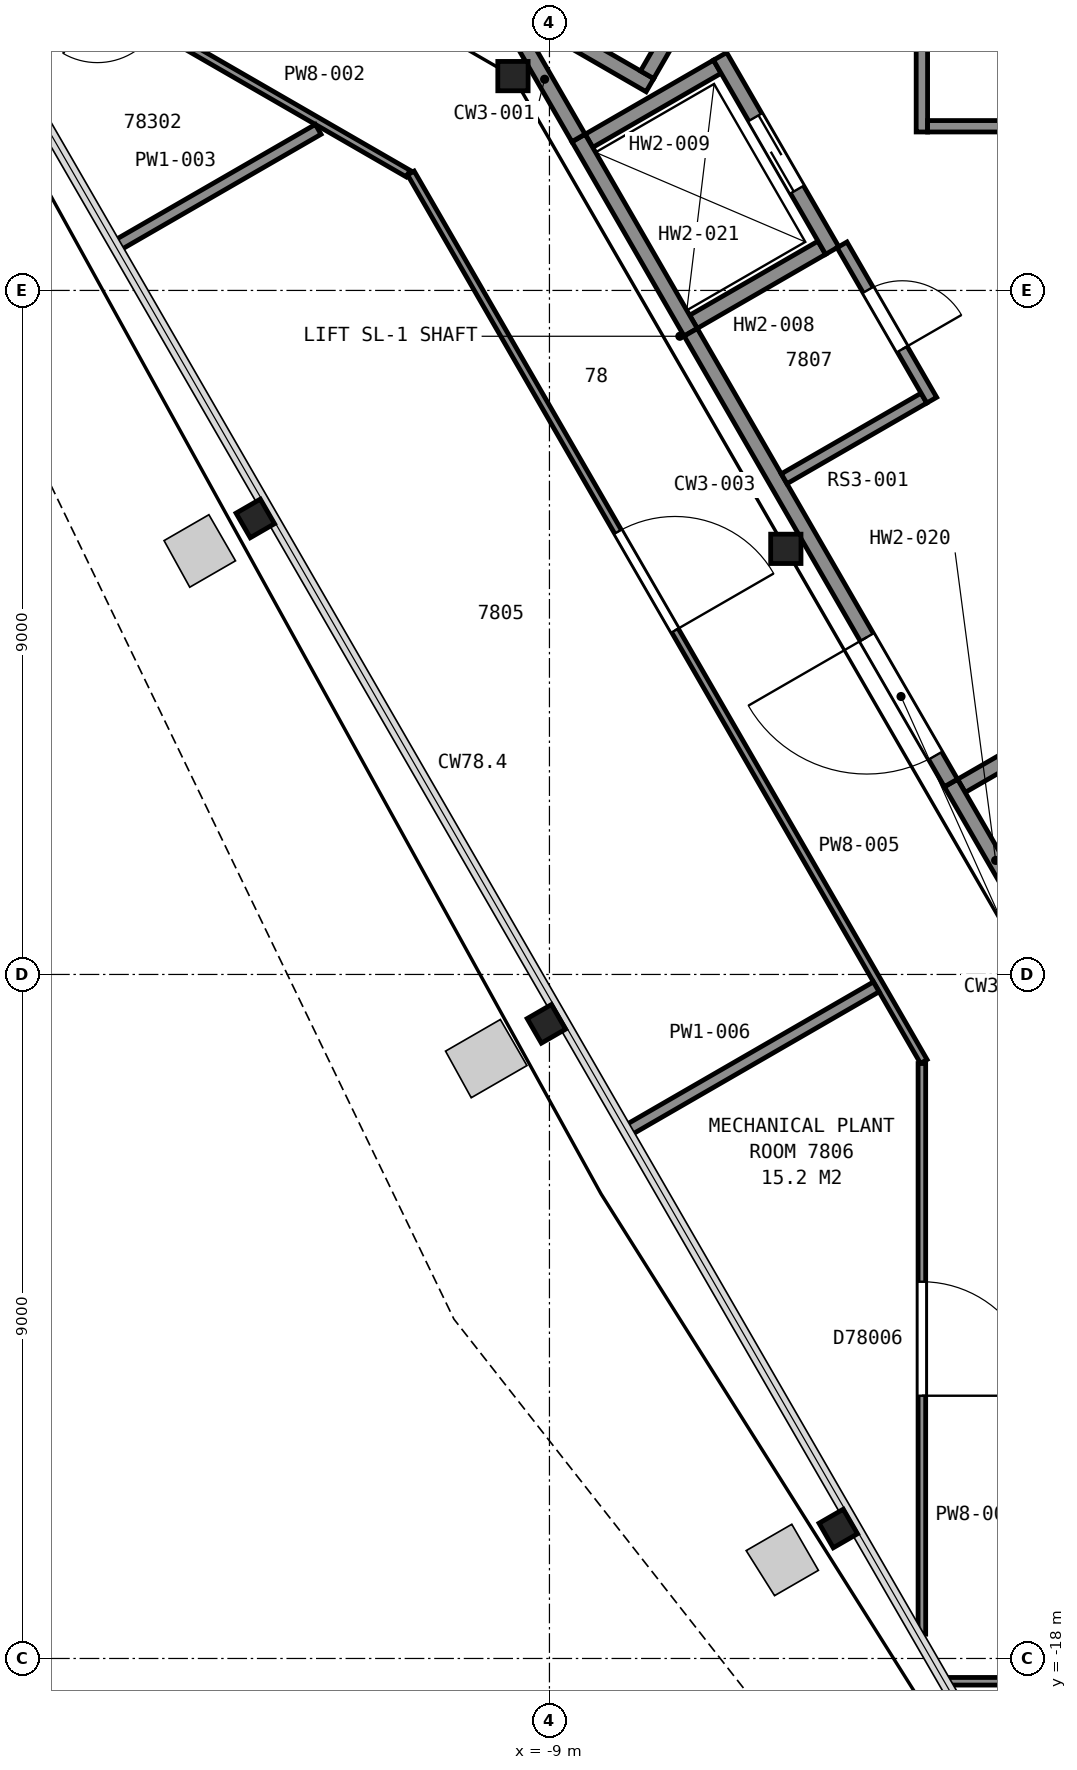
"""IFC4 building model, lengths in metres.
Left out: names, types, materials, properties, quantities, classifications, styles, units other than length and angle.
Written with IfcOpenShell. Run it as: python <this file> out.ifc"""

import sys

from ifc_helpers import new_model, si_unit, direction, frame, frame_2d, origin, origin_2d, place, context, subcontext, project, spatial, rectangle, i_section, extrude, element, fill, save


model = new_model("IFC4")
c1 = context("Model", 3, precision=1e-05, world=origin(), true_north=direction((0.0, 1.0)))
c2 = subcontext(c1, "Body", "Model", "MODEL_VIEW")
j1 = project(units=[si_unit("LENGTHUNIT", "METRE"), si_unit("PLANEANGLEUNIT", "RADIAN")], contexts=[c1])
p1 = place(None, origin())
s1 = spatial("IfcSite", under=j1, at=p1, CompositionType="ELEMENT")
p2 = place(p1, origin())
s2 = spatial("IfcBuilding", under=s1, at=p2, CompositionType="ELEMENT")
p3 = place(p2, frame((0.0, 0.0, 308.4)))
s3 = spatial("IfcBuildingStorey", under=s2, at=p3, CompositionType="ELEMENT", Elevation=308.4)
for number, where, z_axis, x_axis in (
    (1, (-12.87, -3.0, 0.045), (0.0, 0.0, 1.0), (-0.5, 0.866, 0.0)),
    (2, (-9.04, -9.65, 0.045), (0.0, 0.0, 1.0), (-0.5, 0.866, 0.0)),
):
    element("IfcColumn", number, at=place(p3, frame(where, z_axis=z_axis, x_axis=x_axis)), inside=s3, PredefinedType="COLUMN", context=c2, shape_type="SweptSolid", body=[
        extrude(i_section(OverallWidth=0.373, OverallDepth=0.368, WebThickness=0.015, FlangeThickness=0.024, FilletRadius=0.015, at=origin_2d()), origin(), (0.0, 0.0, 1.0), 4.155),
    ])
p4 = place(p3, frame((-5.2, -16.29, 0.055), z_axis=(0.0, 0.0, 1.0), x_axis=(-0.5, 0.866025403784, 0.0)))
e3 = element("IfcColumn", 3, at=p4, inside=s3, PredefinedType="COLUMN", context=c2, shape_type="SweptSolid", body=[
    extrude(i_section(OverallWidth=0.373, OverallDepth=0.368, WebThickness=0.015, FlangeThickness=0.024, FilletRadius=0.015, at=origin_2d()), origin(), (0.0, 0.0, 1.0), 4.145),
])
for number, where, z_axis, x_axis in (
    (4, (-9.48, 2.82, 0.0), (0.0, 0.0, 1.0), (1.0, 0.0, 0.0)),
    (5, (-5.89, -3.4, 0.0), (0.0, 0.0, 1.0), (1.0, 0.0, 0.0)),
):
    element("IfcColumn", number, at=place(p3, frame(where, z_axis=z_axis, x_axis=x_axis)), inside=s3, PredefinedType="COLUMN", context=c2, shape_type="SweptSolid", body=[
        extrude(i_section(OverallWidth=0.399, OverallDepth=0.386, WebThickness=0.021, FlangeThickness=0.033, FilletRadius=0.015, at=origin_2d()), origin(), (0.0, 0.0, 1.0), 4.2),
    ])
p5 = place(p3, frame((-7.678, 2.701, 0.0), z_axis=(0.0, 0.0, 1.0), x_axis=(-0.866018442252, 0.500012057535, 0.0)))
e6 = element("IfcWall", 6, at=p5, inside=s3, PredefinedType="PARTITIONING", context=c2, shape_type="SweptSolid", body=[
    extrude(rectangle(XDim=7.2, YDim=0.2, at=frame_2d((3.6, 0.0))), origin(), (0.0, 0.0, 1.0), 3.95),
])
p6 = place(p3, frame((-6.315, 5.262, 0.0), z_axis=(0.0, 0.0, 1.0), x_axis=(-0.500049511043, -0.865996816683, 0.0)))
e7 = element("IfcWall", 7, at=p6, inside=s3, PredefinedType="PARTITIONING", context=c2, shape_type="SweptSolid", body=[
    extrude(rectangle(XDim=2.8, YDim=0.2, at=frame_2d((1.4, 0.0))), origin(), (0.0, 0.0, 1.0), 3.95),
])
p7 = place(p3, frame((-3.58, -6.519, 0.0), z_axis=(0.0, 0.0, 1.0), x_axis=(0.866002029911, 0.500040482552, 0.0)))
e8 = element("IfcWall", 8, at=p7, inside=s3, PredefinedType="PARTITIONING", context=c2, shape_type="SweptSolid", body=[
    extrude(rectangle(XDim=1.75, YDim=0.2, at=frame_2d((0.875, 0.0))), origin(), (0.0, 0.0, 1.0), 3.95),
])
for number, where, z_axis, x_axis in (
    (9, (-7.105, -0.413, 0.0), (0.0, 0.0, 1.0), (0.866, 0.5, 0.0)),
    (10, (-8.48, 1.969, 0.0), (0.0, 0.0, 1.0), (0.866, 0.5, 0.0)),
):
    element("IfcWall", number, at=place(p3, frame(where, z_axis=z_axis, x_axis=x_axis)), inside=s3, PredefinedType="PARTITIONING", context=c2, shape_type="SweptSolid", body=[
        extrude(rectangle(XDim=1.95, YDim=0.2, at=frame_2d((0.975, 0.0))), origin(), (0.0, 0.0, 1.0), 4.2),
    ])
p8 = place(p3, frame((-5.28, 0.525, 0.0), z_axis=(0.0, 0.0, 1.0), x_axis=(-0.500037662692, 0.866003658127, 0.0)))
e11 = element("IfcWall", 11, at=p8, inside=s3, PredefinedType="PARTITIONING", context=c2, shape_type="SweptSolid", body=[
    extrude(rectangle(XDim=2.95, YDim=0.2, at=frame_2d((1.475, 0.0))), origin(), (0.0, 0.0, 1.0), 4.2),
])
p9 = place(p8, frame((0.925, 0.0, 0.0)))
e12 = element("IfcOpeningElement", 12, at=p9, cuts=e11, PredefinedType="OPENING", context=c2, shape_type="SweptSolid", body=[
    extrude(rectangle(XDim=1.1, YDim=2.1, at=frame_2d((0.55, 1.05))), frame((0.0, 0.11, 0.0), z_axis=(0.0, -1.0, 0.0), x_axis=(1.0, 0.0, 0.0)), (0.0, 0.0, 1.0), 0.22),
])
p10 = place(p3, frame((-2.542, -8.517, 0.0), z_axis=(0.0, 0.0, 1.0), x_axis=(-0.500016218704, 0.866016039709, 0.0)))
e13 = element("IfcWall", 13, at=p10, inside=s3, PredefinedType="PARTITIONING", context=c2, shape_type="SweptSolid", body=[
    extrude(rectangle(XDim=2.35, YDim=0.2, at=frame_2d((1.175, 0.0))), origin(), (0.0, 0.0, 1.0), 3.95),
])
p11 = place(p3, frame((-7.142, -0.55, 0.0), z_axis=(0.0, 0.0, 1.0), x_axis=(-0.49997559174, 0.866039495442, 0.0)))
e14 = element("IfcWall", 14, at=p11, inside=s3, PredefinedType="PARTITIONING", context=c2, shape_type="SweptSolid", body=[
    extrude(rectangle(XDim=2.95, YDim=0.2, at=frame_2d((1.475, 0.0))), origin(), (0.0, 0.0, 1.0), 4.2),
])
p12 = place(p3, frame((-9.509, 3.551, 0.0), z_axis=(0.0, 0.0, 1.0), x_axis=(0.499999136801, -0.866025902152, 0.0)))
e15 = element("IfcWall", 15, at=p12, inside=s3, PredefinedType="PARTITIONING", context=c2, shape_type="SweptSolid", body=[
    extrude(rectangle(XDim=1.782, YDim=0.2, at=frame_2d((0.891, 0.0))), origin(), (0.0, 0.0, 1.0), 3.95),
])
p13 = place(p3, frame((-7.141, -0.551, 0.0), z_axis=(0.0, 0.0, 1.0), x_axis=(0.500001302854, -0.86602465158, 0.0)))
e16 = element("IfcWall", 16, at=p13, inside=s3, PredefinedType="PARTITIONING", context=c2, shape_type="SweptSolid", body=[
    extrude(rectangle(XDim=6.846, YDim=0.2, at=frame_2d((3.423, 0.0))), origin(), (0.0, 0.0, 1.0), 3.95),
])
p14 = place(p13, frame((4.633, 0.0, 0.0)))
e17 = element("IfcOpeningElement", 17, at=p14, cuts=e16, PredefinedType="OPENING", context=c2, shape_type="SweptSolid", body=[
    extrude(rectangle(XDim=1.8, YDim=2.1, at=frame_2d((0.9, 1.05))), frame((0.0, 0.11, 0.0), z_axis=(0.0, -1.0, 0.0), x_axis=(1.0, 0.0, 0.0)), (0.0, 0.0, 1.0), 0.22),
])
p15 = place(p3, frame((-5.912, -2.478, 0.0), z_axis=(0.0, 0.0, 1.0), x_axis=(0.86611284933, 0.499848509276, 0.0)))
e18 = element("IfcWall", 18, at=p15, inside=s3, PredefinedType="PARTITIONING", context=c2, shape_type="SweptSolid", body=[
    extrude(rectangle(XDim=2.124, YDim=0.15, at=frame_2d((1.062, 0.0))), origin(), (0.0, 0.0, 1.0), 3.95),
])
p16 = place(p3, frame((-3.97, -1.444, 0.0), z_axis=(0.0, 0.0, 1.0), x_axis=(-0.499955275397, 0.866051224006, 0.0)))
e19 = element("IfcWall", 19, at=p16, inside=s3, PredefinedType="PARTITIONING", context=c2, shape_type="SweptSolid", body=[
    extrude(rectangle(XDim=2.36, YDim=0.15, at=frame_2d((1.18, 0.0))), origin(), (0.0, 0.0, 1.0), 3.95),
])
p17 = place(p16, frame((0.775, 0.0, 0.0)))
e20 = element("IfcOpeningElement", 20, at=p17, cuts=e19, PredefinedType="OPENING", context=c2, shape_type="SweptSolid", body=[
    extrude(rectangle(XDim=0.9, YDim=2.1, at=frame_2d((0.45, 1.05))), frame((0.0, 0.085, 0.0), z_axis=(0.0, -1.0, 0.0), x_axis=(1.0, 0.0, 0.0)), (0.0, 0.0, 1.0), 0.17),
])
p18 = place(p3, frame((-4.1, 2.085, 0.0), z_axis=(0.0, 0.0, 1.0), x_axis=(0.0, 1.0, 0.0)))
e21 = element("IfcWall", 21, at=p18, inside=s3, PredefinedType="PARTITIONING", context=c2, shape_type="SweptSolid", body=[
    extrude(rectangle(XDim=4.23, YDim=0.15, at=frame_2d((2.115, 0.0))), origin(), (0.0, 0.0, 1.0), 3.95),
])
p19 = place(p18, frame((1.625, 0.0, 0.0)))
e22 = element("IfcOpeningElement", 22, at=p19, cuts=e21, PredefinedType="OPENING", context=c2, shape_type="SweptSolid", body=[
    extrude(rectangle(XDim=1.0, YDim=2.1, at=frame_2d((0.5, 1.05))), frame((0.0, 0.085, 0.0), z_axis=(0.0, -1.0, 0.0), x_axis=(1.0, 0.0, 0.0)), (0.0, 0.0, 1.0), 0.17),
])
p20 = place(p3, frame((-4.025, 2.16, 0.0), z_axis=(0.0, 0.0, 1.0), x_axis=(1.0, 0.0, 0.0)))
e23 = element("IfcWall", 23, at=p20, inside=s3, PredefinedType="PARTITIONING", context=c2, shape_type="SweptSolid", body=[
    extrude(rectangle(XDim=1.238, YDim=0.15, at=frame_2d((0.619, 0.0))), origin(), (0.0, 0.0, 1.0), 3.95),
])
p21 = place(p3, frame((-10.859, 1.537, 0.0), z_axis=(0.0, 0.0, 1.0), x_axis=(-0.866105995393, 0.499860385252, 0.0)))
e24 = element("IfcWall", 24, at=p21, inside=s3, PredefinedType="PARTITIONING", context=c2, shape_type="SweptSolid", body=[
    extrude(rectangle(XDim=7.508, YDim=0.1, at=frame_2d((3.754, 0.0))), origin(), (0.0, 0.0, 1.0), 3.297),
])
p22 = place(p21, frame((3.822, 0.0, 0.0)))
e25 = element("IfcOpeningElement", 25, at=p22, cuts=e24, PredefinedType="OPENING", context=c2, shape_type="SweptSolid", body=[
    extrude(rectangle(XDim=0.9, YDim=2.1, at=frame_2d((0.45, 1.05))), frame((0.0, 0.06, 0.0), z_axis=(0.0, -1.0, 0.0), x_axis=(1.0, 0.0, 0.0)), (0.0, 0.0, 1.0), 0.12),
])
p23 = place(p3, frame((-14.696, 0.588, 0.0), z_axis=(0.0, 0.0, 1.0), x_axis=(0.866116586143, 0.499842034255, 0.0)))
e26 = element("IfcWall", 26, at=p23, inside=s3, PredefinedType="PARTITIONING", context=c2, shape_type="SweptSolid", body=[
    extrude(rectangle(XDim=3.063, YDim=0.15, at=frame_2d((1.532, 0.0))), origin(), (0.0, 0.0, 1.0), 3.297),
])
p24 = place(p3, frame((-4.075, -10.145, 0.0), z_axis=(0.0, 0.0, 1.0), x_axis=(-0.499912942625, 0.866075660549, 0.0)))
e27 = element("IfcWall", 27, at=p24, inside=s3, PredefinedType="PARTITIONING", context=c2, shape_type="SweptSolid", body=[
    extrude(rectangle(XDim=13.499, YDim=0.1, at=frame_2d((6.749, 0.0))), origin(), (0.0, 0.0, 1.0), 3.297),
])
p25 = place(p24, frame((6.548, 0.0, 0.0)))
e28 = element("IfcOpeningElement", 28, at=p25, cuts=e27, PredefinedType="OPENING", context=c2, shape_type="SweptSolid", body=[
    extrude(rectangle(XDim=1.5, YDim=2.1, at=frame_2d((0.75, 1.05))), frame((0.0, 0.06, 0.0), z_axis=(0.0, -1.0, 0.0), x_axis=(1.0, 0.0, 0.0)), (0.0, 0.0, 1.0), 0.12),
])
p26 = place(p3, frame((-7.975, -11.054, 0.0), z_axis=(0.0, 0.0, 1.0), x_axis=(0.865981276422, 0.500076423046, 0.0)))
e29 = element("IfcWall", 29, at=p26, inside=s3, PredefinedType="PARTITIONING", context=c2, shape_type="SweptSolid", body=[
    extrude(rectangle(XDim=3.781, YDim=0.15, at=frame_2d((1.891, 0.0))), origin(), (0.0, 0.0, 1.0), 3.297),
])
p27 = place(p3, frame((-4.1, -17.68, 0.0), z_axis=(0.0, 0.0, 1.0), x_axis=(0.0, 1.0, 0.0)))
e30 = element("IfcWall", 30, at=p27, inside=s3, PredefinedType="PARTITIONING", context=c2, shape_type="SweptSolid", body=[
    extrude(rectangle(XDim=7.508, YDim=0.1, at=frame_2d((3.754, 0.0))), origin(), (0.0, 0.0, 1.0), 3.297),
])
p28 = place(p27, frame((3.137, 0.0, 0.0)))
e31 = element("IfcOpeningElement", 31, at=p28, cuts=e30, PredefinedType="OPENING", context=c2, shape_type="SweptSolid", body=[
    extrude(rectangle(XDim=1.5, YDim=2.1, at=frame_2d((0.75, 1.05))), frame((0.0, 0.06, 0.0), z_axis=(0.0, -1.0, 0.0), x_axis=(1.0, 0.0, 0.0)), (0.0, 0.0, 1.0), 0.12),
])
p29 = place(p3, frame((3.763, -18.3, 0.0), z_axis=(0.0, 0.0, 1.0), x_axis=(-1.0, 0.0, 0.0)))
e32 = element("IfcWall", 32, at=p29, inside=s3, PredefinedType="PARTITIONING", context=c2, shape_type="SweptSolid", body=[
    extrude(rectangle(XDim=7.526, YDim=0.1, at=frame_2d((3.763, 0.0))), origin(), (0.0, 0.0, 1.0), 3.297),
])
p30 = place(p29, frame((3.147, 0.0, 0.0)))
e33 = element("IfcOpeningElement", 33, at=p30, cuts=e32, PredefinedType="OPENING", context=c2, shape_type="SweptSolid", body=[
    extrude(rectangle(XDim=1.2, YDim=2.1, at=frame_2d((0.6, 1.05))), frame((0.0, 0.06, 0.0), z_axis=(0.0, -1.0, 0.0), x_axis=(1.0, 0.0, 0.0)), (0.0, 0.0, 1.0), 0.12),
])
p31 = place(p9, origin())
e34 = element("IfcDoor", 34, at=p31, inside=s3, OperationType="SLIDING_TO_LEFT", PredefinedType="DOOR", context=c2, shape_type="SweptSolid", body=[
    extrude(rectangle(XDim=1.1, YDim=2.1, at=frame_2d((0.55, 1.05))), frame((0.0, 0.025, 0.0), z_axis=(0.0, -1.0, 0.0), x_axis=(1.0, 0.0, 0.0)), (0.0, 0.0, 1.0), 0.05),
])
fill(e12, e34)
p32 = place(p14, origin())
e35 = element("IfcDoor", 35, at=p32, inside=s3, OperationType="DOUBLE_DOOR_SINGLE_SWING", PredefinedType="DOOR", context=c2, shape_type="SweptSolid", body=[
    extrude(rectangle(XDim=1.8, YDim=2.1, at=frame_2d((0.9, 1.05))), frame((0.0, 0.025, 0.0), z_axis=(0.0, -1.0, 0.0), x_axis=(1.0, 0.0, 0.0)), (0.0, 0.0, 1.0), 0.05),
])
fill(e17, e35)
p33 = place(p17, origin())
e36 = element("IfcDoor", 36, at=p33, inside=s3, OperationType="SINGLE_SWING_LEFT", PredefinedType="DOOR", context=c2, shape_type="SweptSolid", body=[
    extrude(rectangle(XDim=0.9, YDim=2.1, at=frame_2d((0.45, 1.05))), frame((0.0, 0.025, 0.0), z_axis=(0.0, -1.0, 0.0), x_axis=(1.0, 0.0, 0.0)), (0.0, 0.0, 1.0), 0.05),
])
fill(e20, e36)
p34 = place(p25, origin())
e37 = element("IfcDoor", 37, at=p34, inside=s3, OperationType="DOUBLE_DOOR_SINGLE_SWING", PredefinedType="DOOR", context=c2, shape_type="SweptSolid", body=[
    extrude(rectangle(XDim=1.5, YDim=2.1, at=frame_2d((0.75, 1.05))), frame((0.0, 0.025, 0.0), z_axis=(0.0, -1.0, 0.0), x_axis=(1.0, 0.0, 0.0)), (0.0, 0.0, 1.0), 0.05),
])
fill(e28, e37)
p35 = place(p28, origin())
e38 = element("IfcDoor", 38, at=p35, inside=s3, OperationType="DOUBLE_DOOR_SINGLE_SWING", PredefinedType="DOOR", context=c2, shape_type="SweptSolid", body=[
    extrude(rectangle(XDim=1.5, YDim=2.1, at=frame_2d((0.75, 1.05))), frame((0.0, 0.025, 0.0), z_axis=(0.0, -1.0, 0.0), x_axis=(1.0, 0.0, 0.0)), (0.0, 0.0, 1.0), 0.05),
])
fill(e31, e38)
save(model, sys.argv[1])
